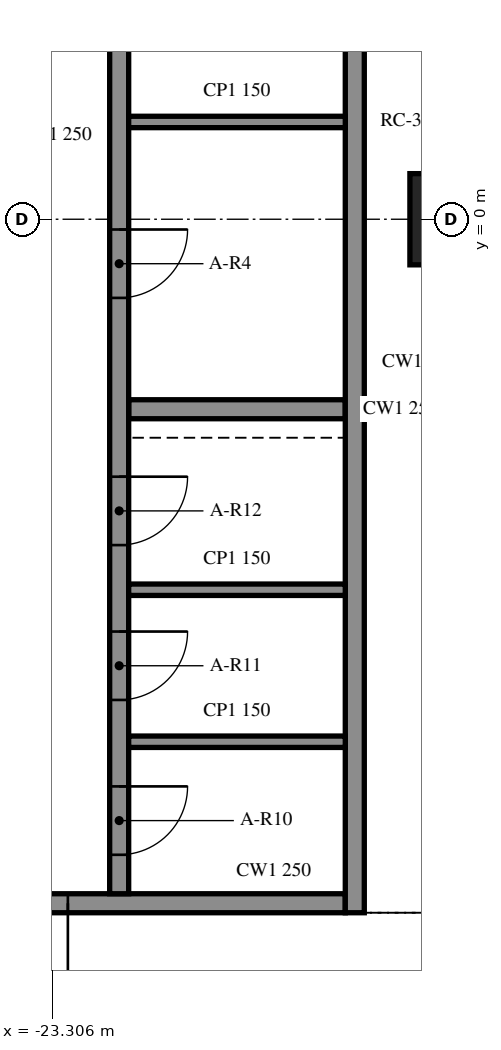
"""IFC4 building model, lengths in metres.
Left out: names, types, materials, properties, quantities, classifications, styles, units other than length and angle.
Written with IfcOpenShell. Run it as: python <this file> out.ifc"""

import sys

from ifc_helpers import new_model, si_unit, direction, frame, frame_2d, origin, origin_2d, place, context, subcontext, project, spatial, rectangle, extrude, element, fill, save


model = new_model("IFC4")
c1 = context("Model", 3, precision=1e-05, world=origin(), true_north=direction((0.0, 1.0)))
c2 = subcontext(c1, "Body", "Model", "MODEL_VIEW")
j1 = project(units=[si_unit("LENGTHUNIT", "METRE"), si_unit("PLANEANGLEUNIT", "RADIAN")], contexts=[c1])
p1 = place(None, origin())
s1 = spatial("IfcSite", under=j1, at=p1, CompositionType="ELEMENT")
p2 = place(p1, origin())
s2 = spatial("IfcBuilding", under=s1, at=p2, CompositionType="ELEMENT")
p3 = place(p2, frame((0.0, 0.0, 189.6)))
s3 = spatial("IfcBuildingStorey", under=s2, at=p3, CompositionType="ELEMENT", Elevation=189.6)
p4 = place(p3, frame((-18.0, 0.0, -0.4), z_axis=(0.0, 0.0, 1.0), x_axis=(1.0, 0.0, 0.0)))
e1 = element("IfcColumn", 1, at=p4, inside=s3, PredefinedType="COLUMN", context=c2, shape_type="SweptSolid", body=[
    extrude(rectangle(XDim=1.2, YDim=1.2, at=origin_2d()), origin(), (0.0, 0.0, 1.0), 4.36),
])
p5 = place(p3, frame((-19.325, -9.125, 0.0), z_axis=(0.0, 0.0, 1.0), x_axis=(0.0, 1.0, 0.0)))
e2 = element("IfcWall", 2, at=p5, inside=s3, PredefinedType="SOLIDWALL", context=c2, shape_type="SweptSolid", body=[
    extrude(rectangle(XDim=24.25, YDim=0.25, at=frame_2d((12.125, 0.0))), origin(), (0.0, 0.0, 1.0), 3.96),
])
p6 = place(p3, frame((-19.45, -9.0, 0.0), z_axis=(0.0, 0.0, 1.0), x_axis=(-1.0, 0.0, 0.0)))
e3 = element("IfcWall", 3, at=p6, inside=s3, PredefinedType="SOLIDWALL", context=c2, shape_type="SweptSolid", body=[
    extrude(rectangle(XDim=9.1, YDim=0.25, at=frame_2d((4.55, 0.0))), origin(), (0.0, 0.0, 1.0), 3.96),
])
p7 = place(p6, frame((3.65, 0.0, 0.0)))
e4 = element("IfcOpeningElement", 4, at=p7, cuts=e3, PredefinedType="OPENING", context=c2, shape_type="SweptSolid", body=[
    extrude(rectangle(XDim=1.8, YDim=2.1, at=frame_2d((0.9, 1.05))), frame((0.0, 0.135, 0.0), z_axis=(0.0, -1.0, 0.0), x_axis=(1.0, 0.0, 0.0)), (0.0, 0.0, 1.0), 0.27),
])
p8 = place(p3, frame((-22.425, 14.875, 0.0), z_axis=(0.0, 0.0, 1.0), x_axis=(0.0, -1.0, 0.0)))
e5 = element("IfcWall", 5, at=p8, inside=s3, PredefinedType="SOLIDWALL", context=c2, shape_type="SweptSolid", body=[
    extrude(rectangle(XDim=23.75, YDim=0.25, at=frame_2d((11.875, 0.0))), origin(), (0.0, 0.0, 1.0), 3.96),
])
p9 = place(p8, frame((15.01, 0.0, 0.0)))
e6 = element("IfcOpeningElement", 6, at=p9, cuts=e5, PredefinedType="OPENING", context=c2, shape_type="SweptSolid", body=[
    extrude(rectangle(XDim=0.9, YDim=2.1, at=frame_2d((0.45, 1.05))), frame((0.0, 0.135, 0.0), z_axis=(0.0, -1.0, 0.0), x_axis=(1.0, 0.0, 0.0)), (0.0, 0.0, 1.0), 0.27),
])
p10 = place(p8, frame((11.371, 0.0, 0.0)))
e7 = element("IfcOpeningElement", 7, at=p10, cuts=e5, PredefinedType="OPENING", context=c2, shape_type="SweptSolid", body=[
    extrude(rectangle(XDim=0.9, YDim=2.1, at=frame_2d((0.45, 1.05))), frame((0.0, 0.135, 0.0), z_axis=(0.0, -1.0, 0.0), x_axis=(1.0, 0.0, 0.0)), (0.0, 0.0, 1.0), 0.27),
])
p11 = place(p8, frame((7.786, 0.0, 0.0)))
e8 = element("IfcOpeningElement", 8, at=p11, cuts=e5, PredefinedType="OPENING", context=c2, shape_type="SweptSolid", body=[
    extrude(rectangle(XDim=0.9, YDim=2.1, at=frame_2d((0.45, 1.05))), frame((0.0, 0.135, 0.0), z_axis=(0.0, -1.0, 0.0), x_axis=(1.0, 0.0, 0.0)), (0.0, 0.0, 1.0), 0.27),
])
p12 = place(p8, frame((22.337, 0.0, 0.0)))
e9 = element("IfcOpeningElement", 9, at=p12, cuts=e5, PredefinedType="OPENING", context=c2, shape_type="SweptSolid", body=[
    extrude(rectangle(XDim=0.9, YDim=2.1, at=frame_2d((0.45, 1.05))), frame((0.0, 0.135, 0.0), z_axis=(0.0, -1.0, 0.0), x_axis=(1.0, 0.0, 0.0)), (0.0, 0.0, 1.0), 0.27),
])
p13 = place(p8, frame((20.3, 0.0, 0.0)))
e10 = element("IfcOpeningElement", 10, at=p13, cuts=e5, PredefinedType="OPENING", context=c2, shape_type="SweptSolid", body=[
    extrude(rectangle(XDim=0.9, YDim=2.1, at=frame_2d((0.45, 1.05))), frame((0.0, 0.135, 0.0), z_axis=(0.0, -1.0, 0.0), x_axis=(1.0, 0.0, 0.0)), (0.0, 0.0, 1.0), 0.27),
])
p14 = place(p8, frame((18.262, 0.0, 0.0)))
e11 = element("IfcOpeningElement", 11, at=p14, cuts=e5, PredefinedType="OPENING", context=c2, shape_type="SweptSolid", body=[
    extrude(rectangle(XDim=0.9, YDim=2.1, at=frame_2d((0.45, 1.05))), frame((0.0, 0.135, 0.0), z_axis=(0.0, -1.0, 0.0), x_axis=(1.0, 0.0, 0.0)), (0.0, 0.0, 1.0), 0.27),
])
p15 = place(p8, frame((3.587, 0.0, 0.0)))
e12 = element("IfcOpeningElement", 12, at=p15, cuts=e5, PredefinedType="OPENING", context=c2, shape_type="SweptSolid", body=[
    extrude(rectangle(XDim=0.9, YDim=2.1, at=frame_2d((0.45, 1.05))), frame((0.0, 0.135, 0.0), z_axis=(0.0, -1.0, 0.0), x_axis=(1.0, 0.0, 0.0)), (0.0, 0.0, 1.0), 0.27),
])
p16 = place(p8, frame((0.512, 0.0, 0.0)))
e13 = element("IfcOpeningElement", 13, at=p16, cuts=e5, PredefinedType="OPENING", context=c2, shape_type="SweptSolid", body=[
    extrude(rectangle(XDim=0.9, YDim=2.1, at=frame_2d((0.45, 1.05))), frame((0.0, 0.135, 0.0), z_axis=(0.0, -1.0, 0.0), x_axis=(1.0, 0.0, 0.0)), (0.0, 0.0, 1.0), 0.27),
])
p17 = place(p3, frame((-22.3, -2.5, 0.0), z_axis=(0.0, 0.0, 1.0), x_axis=(1.0, 0.0, 0.0)))
e14 = element("IfcWall", 14, at=p17, inside=s3, PredefinedType="SOLIDWALL", context=c2, shape_type="SweptSolid", body=[
    extrude(rectangle(XDim=2.85, YDim=0.25, at=frame_2d((1.425, 0.0))), origin(), (0.0, 0.0, 1.0), 3.96),
])
for number, where, z_axis, x_axis in (
    (15, (-22.3, 1.28, 0.0), (0.0, 0.0, 1.0), (1.0, 0.0, 0.0)),
    (16, (-22.3, -6.875, 0.0), (0.0, 0.0, 1.0), (1.0, 0.0, 0.0)),
    (17, (-22.3, -4.875, 0.0), (0.0, 0.0, 1.0), (1.0, 0.0, 0.0)),
):
    element("IfcWall", number, at=place(p3, frame(where, z_axis=z_axis, x_axis=x_axis)), inside=s3, PredefinedType="PARTITIONING", context=c2, shape_type="SweptSolid", body=[
        extrude(rectangle(XDim=2.85, YDim=0.15, at=frame_2d((1.425, 0.0))), origin(), (0.0, 0.0, 1.0), 3.96),
    ])
p18 = place(p7, origin())
e18 = element("IfcDoor", 18, at=p18, inside=s3, OperationType="DOUBLE_DOOR_SINGLE_SWING", PredefinedType="DOOR", context=c2, shape_type="SweptSolid", body=[
    extrude(rectangle(XDim=1.8, YDim=2.1, at=frame_2d((0.9, 1.05))), frame((0.0, 0.025, 0.0), z_axis=(0.0, -1.0, 0.0), x_axis=(1.0, 0.0, 0.0)), (0.0, 0.0, 1.0), 0.05),
])
fill(e4, e18)
p19 = place(p9, origin())
e19 = element("IfcDoor", 19, at=p19, inside=s3, OperationType="SINGLE_SWING_RIGHT", PredefinedType="DOOR", context=c2, shape_type="SweptSolid", body=[
    extrude(rectangle(XDim=0.9, YDim=2.1, at=frame_2d((0.45, 1.05))), frame((0.0, 0.025, 0.0), z_axis=(0.0, -1.0, 0.0), x_axis=(1.0, 0.0, 0.0)), (0.0, 0.0, 1.0), 0.05),
])
fill(e6, e19)
p20 = place(p12, origin())
e20 = element("IfcDoor", 20, at=p20, inside=s3, OperationType="SINGLE_SWING_RIGHT", PredefinedType="DOOR", context=c2, shape_type="SweptSolid", body=[
    extrude(rectangle(XDim=0.9, YDim=2.1, at=frame_2d((0.45, 1.05))), frame((0.0, 0.025, 0.0), z_axis=(0.0, -1.0, 0.0), x_axis=(1.0, 0.0, 0.0)), (0.0, 0.0, 1.0), 0.05),
])
fill(e9, e20)
p21 = place(p13, origin())
e21 = element("IfcDoor", 21, at=p21, inside=s3, OperationType="SINGLE_SWING_LEFT", PredefinedType="DOOR", context=c2, shape_type="SweptSolid", body=[
    extrude(rectangle(XDim=0.9, YDim=2.1, at=frame_2d((0.45, 1.05))), frame((0.0, 0.025, 0.0), z_axis=(0.0, -1.0, 0.0), x_axis=(1.0, 0.0, 0.0)), (0.0, 0.0, 1.0), 0.05),
])
fill(e10, e21)
p22 = place(p14, origin())
e22 = element("IfcDoor", 22, at=p22, inside=s3, OperationType="SINGLE_SWING_RIGHT", PredefinedType="DOOR", context=c2, shape_type="SweptSolid", body=[
    extrude(rectangle(XDim=0.9, YDim=2.1, at=frame_2d((0.45, 1.05))), frame((0.0, 0.025, 0.0), z_axis=(0.0, -1.0, 0.0), x_axis=(1.0, 0.0, 0.0)), (0.0, 0.0, 1.0), 0.05),
])
fill(e11, e22)
save(model, sys.argv[1])
